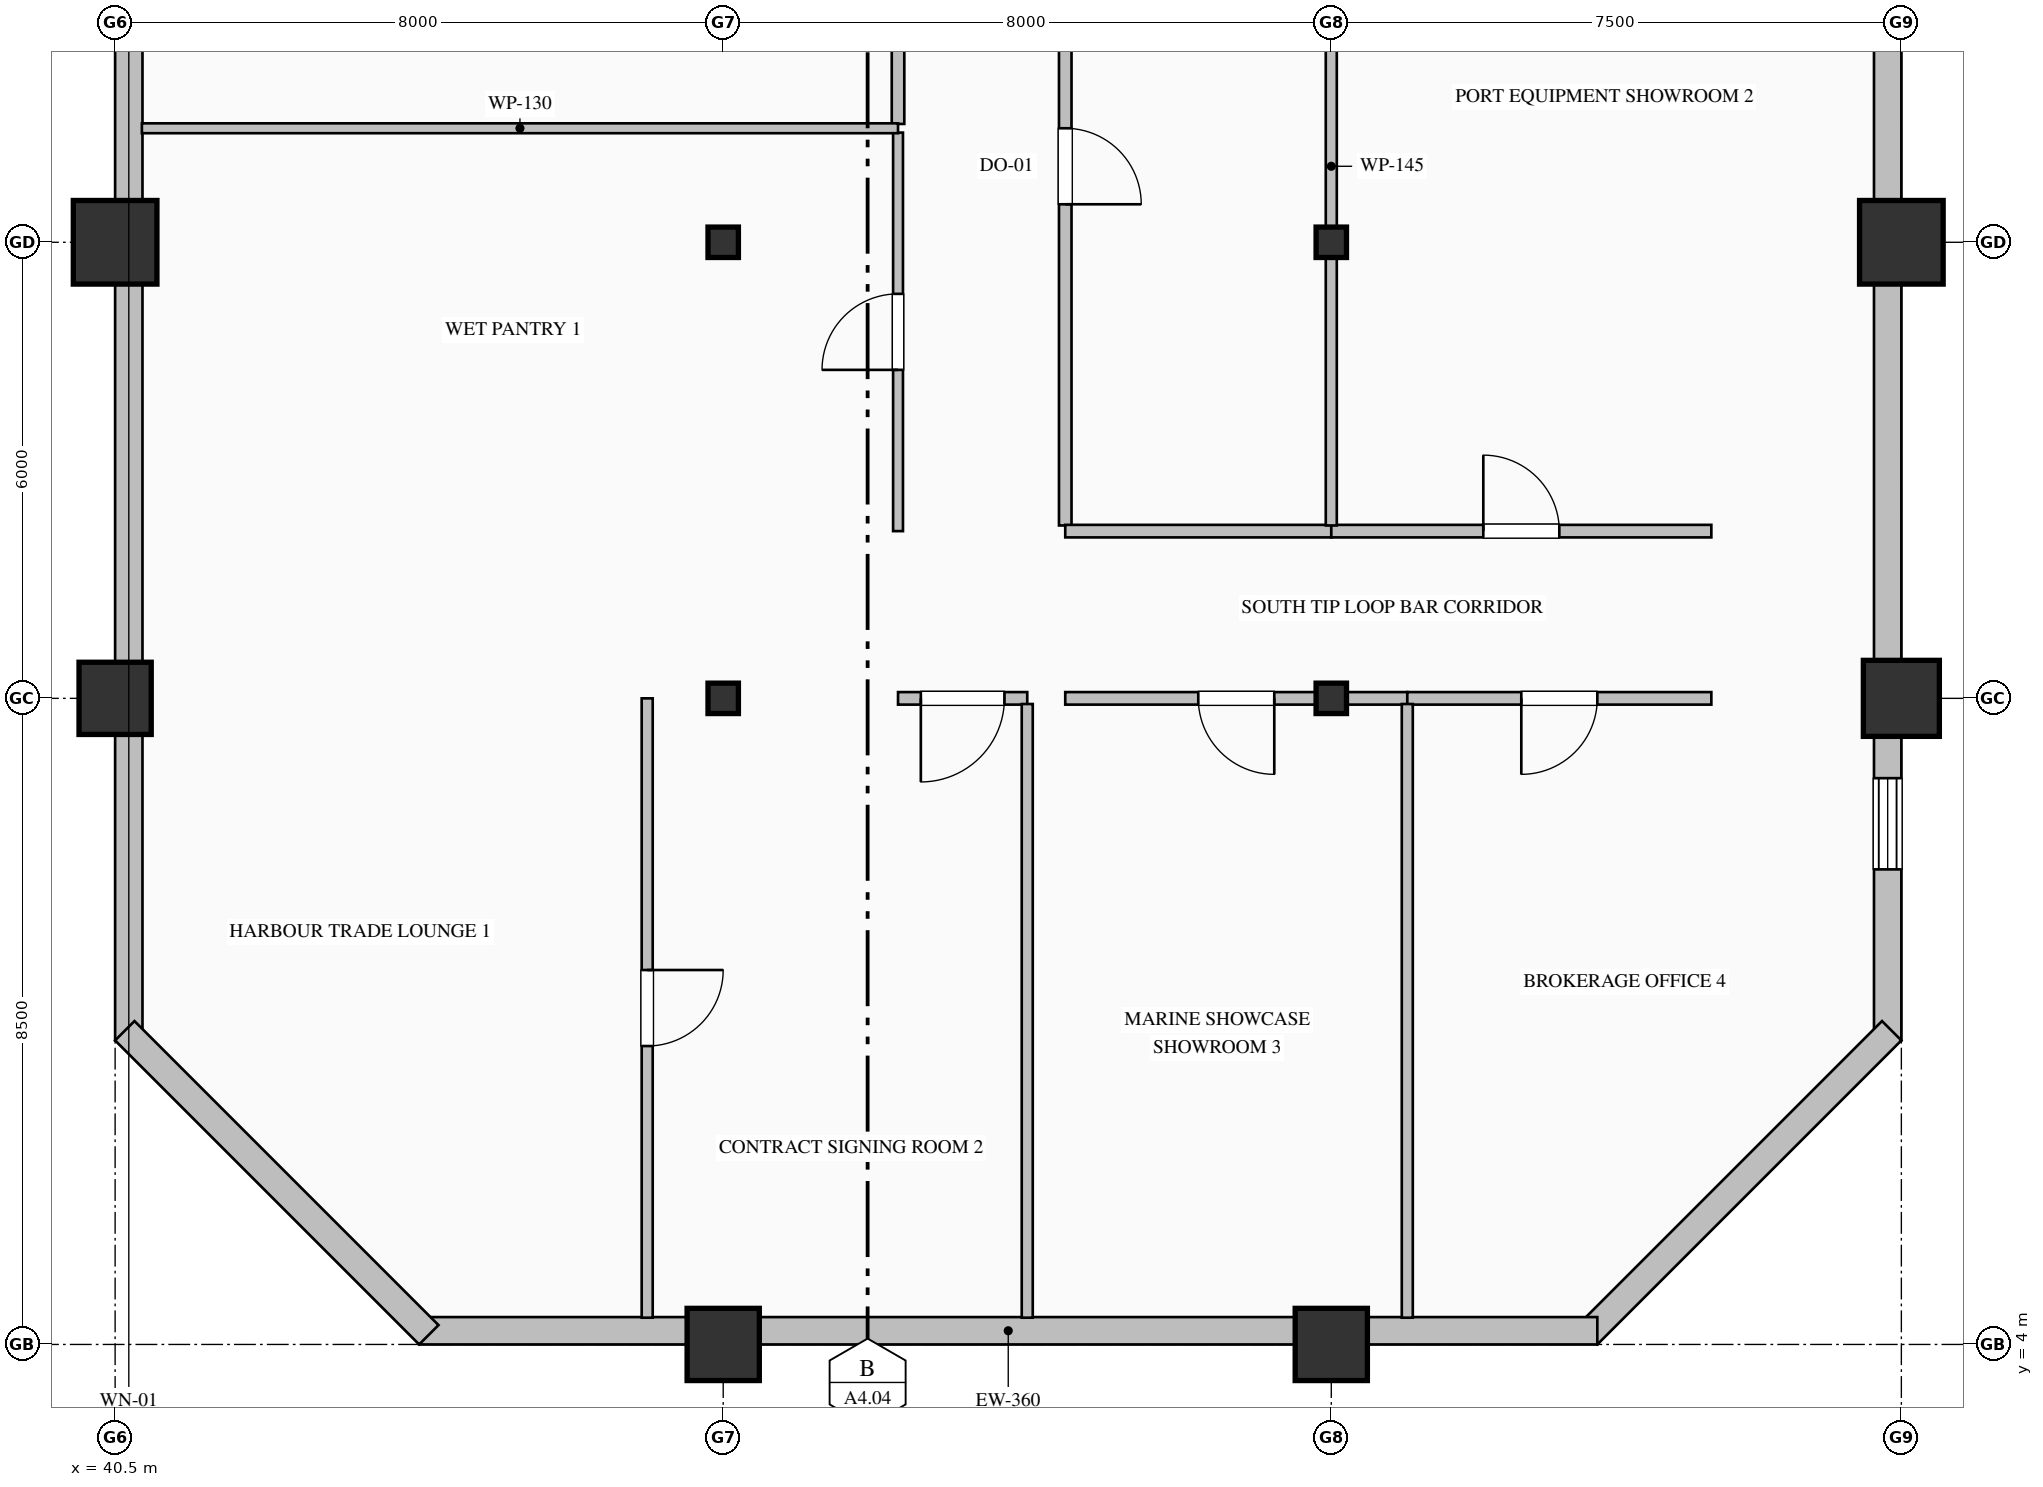
"""IFC4 building model, lengths in metres.
Left out: names, types, materials, properties, quantities, classifications, styles, units other than length and angle.
Written with IfcOpenShell. Run it as: python <this file> out.ifc"""

import sys

from ifc_helpers import new_model, si_unit, direction, frame, frame_2d, origin, origin_2d, place, context, subcontext, project, spatial, rectangle, hollow_rectangle, hollow_circle, i_section, extrude, element, fill, save


model = new_model("IFC4")
c1 = context("Model", 3, precision=1e-05, world=origin(), true_north=direction((0.0, 1.0)))
c2 = subcontext(c1, "Body", "Model", "MODEL_VIEW")
j1 = project(units=[si_unit("LENGTHUNIT", "METRE"), si_unit("PLANEANGLEUNIT", "RADIAN")], contexts=[c1])
p1 = place(None, origin())
s1 = spatial("IfcSite", under=j1, at=p1, CompositionType="ELEMENT")
p2 = place(p1, origin())
s2 = spatial("IfcBuilding", under=s1, at=p2, CompositionType="ELEMENT")
p3 = place(p2, frame((0.0, 0.0, 183.0)))
s3 = spatial("IfcBuildingStorey", under=s2, at=p3, CompositionType="ELEMENT", Elevation=183.0)
p4 = place(p3, frame((40.5, 12.5, 0.0), z_axis=(0.0, 0.0, 1.0), x_axis=(1.0, 0.0, 0.0)))
e1 = element("IfcColumn", 1, at=p4, inside=s3, PredefinedType="COLUMN", context=c2, shape_type="SweptSolid", body=[
    extrude(hollow_rectangle(XDim=0.95, YDim=0.95, WallThickness=0.036, at=origin_2d()), origin(), (0.0, 0.0, 1.0), 4.0),
])
p5 = place(p3, frame((40.5, 18.5, 0.0), z_axis=(0.0, 0.0, 1.0), x_axis=(1.0, 0.0, 0.0)))
e2 = element("IfcColumn", 2, at=p5, inside=s3, PredefinedType="COLUMN", context=c2, shape_type="SweptSolid", body=[
    extrude(hollow_rectangle(XDim=1.1, YDim=1.1, WallThickness=0.04, at=origin_2d()), origin(), (0.0, 0.0, 1.0), 4.0),
])
p6 = place(p3, frame((48.5, 4.0, 0.0), z_axis=(0.0, 0.0, 1.0), x_axis=(1.0, 0.0, 0.0)))
e3 = element("IfcColumn", 3, at=p6, inside=s3, PredefinedType="COLUMN", context=c2, shape_type="SweptSolid", body=[
    extrude(hollow_rectangle(XDim=0.95, YDim=0.95, WallThickness=0.036, at=origin_2d()), origin(), (0.0, 0.0, 1.0), 4.0),
])
for number, where, z_axis, x_axis in (
    (4, (48.5, 12.5, 0.0), (0.0, 0.0, 1.0), (1.0, 0.0, 0.0)),
    (5, (48.5, 18.5, 0.0), (0.0, 0.0, 1.0), (1.0, 0.0, 0.0)),
):
    element("IfcColumn", number, at=place(p3, frame(where, z_axis=z_axis, x_axis=x_axis)), inside=s3, PredefinedType="COLUMN", context=c2, shape_type="SweptSolid", body=[
        extrude(i_section(OverallWidth=0.4, OverallDepth=0.4, WebThickness=0.013, FlangeThickness=0.021, FilletRadius=0.022, at=origin_2d()), origin(), (0.0, 0.0, 1.0), 4.0),
    ])
p7 = place(p3, frame((56.5, 4.0, 0.0), z_axis=(0.0, 0.0, 1.0), x_axis=(1.0, 0.0, 0.0)))
e6 = element("IfcColumn", 6, at=p7, inside=s3, PredefinedType="COLUMN", context=c2, shape_type="SweptSolid", body=[
    extrude(hollow_rectangle(XDim=0.95, YDim=0.95, WallThickness=0.036, at=origin_2d()), origin(), (0.0, 0.0, 1.0), 4.0),
])
for number, where, z_axis, x_axis in (
    (7, (56.5, 12.5, 0.0), (0.0, 0.0, 1.0), (1.0, 0.0, 0.0)),
    (8, (56.5, 18.5, 0.0), (0.0, 0.0, 1.0), (1.0, 0.0, 0.0)),
):
    element("IfcColumn", number, at=place(p3, frame(where, z_axis=z_axis, x_axis=x_axis)), inside=s3, PredefinedType="COLUMN", context=c2, shape_type="SweptSolid", body=[
        extrude(i_section(OverallWidth=0.4, OverallDepth=0.4, WebThickness=0.013, FlangeThickness=0.021, FilletRadius=0.022, at=origin_2d()), origin(), (0.0, 0.0, 1.0), 4.0),
    ])
p8 = place(p3, frame((64.0, 12.5, 0.0), z_axis=(0.0, 0.0, 1.0), x_axis=(1.0, 0.0, 0.0)))
e9 = element("IfcColumn", 9, at=p8, inside=s3, PredefinedType="COLUMN", context=c2, shape_type="SweptSolid", body=[
    extrude(hollow_circle(Radius=0.5, WallThickness=0.036, at=origin_2d()), origin(), (0.0, 0.0, 1.0), 4.0),
])
p9 = place(p3, frame((64.0, 18.5, 0.0), z_axis=(0.0, 0.0, 1.0), x_axis=(1.0, 0.0, 0.0)))
e10 = element("IfcColumn", 10, at=p9, inside=s3, PredefinedType="COLUMN", context=c2, shape_type="SweptSolid", body=[
    extrude(hollow_rectangle(XDim=1.1, YDim=1.1, WallThickness=0.04, at=origin_2d()), origin(), (0.0, 0.0, 1.0), 4.0),
])
p10 = place(p3, frame((40.68, 8.0, 0.0), z_axis=(0.0, 0.0, 1.0), x_axis=(0.0, 1.0, 0.0)))
e11 = element("IfcWall", 11, at=p10, inside=s3, PredefinedType="SOLIDWALL", context=c2, shape_type="SweptSolid", body=[
    extrude(rectangle(XDim=20.36, YDim=0.36, at=frame_2d((10.18, 0.0))), origin(), (0.0, 0.0, 1.0), 3.165),
])
p11 = place(p10, frame((13.8, 0.0, 0.7)))
e12 = element("IfcOpeningElement", 12, at=p11, cuts=e11, PredefinedType="OPENING", context=c2, shape_type="SweptSolid", body=[
    extrude(rectangle(XDim=1.2, YDim=1.85, at=frame_2d((0.6, 0.925))), frame((0.0, 0.19, 0.0), z_axis=(0.0, -1.0, 0.0), x_axis=(1.0, 0.0, 0.0)), (0.0, 0.0, 1.0), 0.38),
])
p12 = place(p3, frame((63.82, 36.05, 0.0), z_axis=(0.0, 0.0, 1.0), x_axis=(0.0, -1.0, 0.0)))
e13 = element("IfcWall", 13, at=p12, inside=s3, PredefinedType="SOLIDWALL", context=c2, shape_type="SweptSolid", body=[
    extrude(rectangle(XDim=28.05, YDim=0.36, at=frame_2d((14.025, 0.0))), origin(), (0.0, 0.0, 1.0), 3.265),
])
p13 = place(p12, frame((3.0, 0.0, 0.7)))
e14 = element("IfcOpeningElement", 14, at=p13, cuts=e13, PredefinedType="OPENING", context=c2, shape_type="SweptSolid", body=[
    extrude(rectangle(XDim=1.2, YDim=1.85, at=frame_2d((0.6, 0.925))), frame((0.0, 0.19, 0.0), z_axis=(0.0, -1.0, 0.0), x_axis=(1.0, 0.0, 0.0)), (0.0, 0.0, 1.0), 0.38),
])
p14 = place(p12, frame((13.8, 0.0, 0.7)))
e15 = element("IfcOpeningElement", 15, at=p14, cuts=e13, PredefinedType="OPENING", context=c2, shape_type="SweptSolid", body=[
    extrude(rectangle(XDim=1.2, YDim=1.85, at=frame_2d((0.6, 0.925))), frame((0.0, 0.19, 0.0), z_axis=(0.0, -1.0, 0.0), x_axis=(1.0, 0.0, 0.0)), (0.0, 0.0, 1.0), 0.38),
])
p15 = place(p12, frame((24.6, 0.0, 0.7)))
e16 = element("IfcOpeningElement", 16, at=p15, cuts=e13, PredefinedType="OPENING", context=c2, shape_type="SweptSolid", body=[
    extrude(rectangle(XDim=1.2, YDim=1.85, at=frame_2d((0.6, 0.925))), frame((0.0, 0.19, 0.0), z_axis=(0.0, -1.0, 0.0), x_axis=(1.0, 0.0, 0.0)), (0.0, 0.0, 1.0), 0.38),
])
p16 = place(p3, frame((63.873, 8.127, 0.0), z_axis=(0.0, 0.0, 1.0), x_axis=(-0.707106781187, -0.707106781187, 0.0)))
e17 = element("IfcWall", 17, at=p16, inside=s3, PredefinedType="SOLIDWALL", context=c2, shape_type="SweptSolid", body=[
    extrude(rectangle(XDim=5.657, YDim=0.36, at=frame_2d((2.828, 0.0))), origin(), (0.0, 0.0, 1.0), 3.765),
])
p17 = place(p3, frame((60.0, 4.18, 0.0), z_axis=(0.0, 0.0, 1.0), x_axis=(-1.0, 0.0, 0.0)))
e18 = element("IfcWall", 18, at=p17, inside=s3, PredefinedType="SOLIDWALL", context=c2, shape_type="SweptSolid", body=[
    extrude(rectangle(XDim=15.5, YDim=0.36, at=frame_2d((7.75, 0.0))), origin(), (0.0, 0.0, 1.0), 3.265),
])
p18 = place(p3, frame((44.627, 4.127, 0.0), z_axis=(0.0, 0.0, 1.0), x_axis=(-0.707106781187, 0.707106781187, 0.0)))
e19 = element("IfcWall", 19, at=p18, inside=s3, PredefinedType="SOLIDWALL", context=c2, shape_type="SweptSolid", body=[
    extrude(rectangle(XDim=5.657, YDim=0.36, at=frame_2d((2.828, 0.0))), origin(), (0.0, 0.0, 1.0), 3.765),
])
p19 = place(p3, frame((53.0, 24.226, 0.0), z_axis=(0.0, 0.0, 1.0), x_axis=(0.0, -1.0, 0.0)))
e20 = element("IfcWall", 20, at=p19, inside=s3, PredefinedType="PARTITIONING", context=c2, shape_type="SweptSolid", body=[
    extrude(rectangle(XDim=9.451, YDim=0.165, at=frame_2d((4.726, 0.0))), origin(), (0.0, 0.0, 1.0), 3.765),
])
p20 = place(p19, frame((4.226, 0.0, 0.0)))
e21 = element("IfcOpeningElement", 21, at=p20, cuts=e20, PredefinedType="OPENING", context=c2, shape_type="SweptSolid", body=[
    extrude(rectangle(XDim=1.0, YDim=2.15, at=frame_2d((0.5, 1.075))), frame((0.0, 0.093, 0.0), z_axis=(0.0, -1.0, 0.0), x_axis=(1.0, 0.0, 0.0)), (0.0, 0.0, 1.0), 0.185),
])
p21 = place(p3, frame((50.8, 14.7, 0.0), z_axis=(0.0, 0.0, 1.0), x_axis=(0.0, 1.0, 0.0)))
e22 = element("IfcWall", 22, at=p21, inside=s3, PredefinedType="PARTITIONING", context=c2, shape_type="SweptSolid", body=[
    extrude(rectangle(XDim=5.243, YDim=0.13, at=frame_2d((2.622, 0.0))), origin(), (0.0, 0.0, 1.0), 3.765),
])
p22 = place(p21, frame((2.122, 0.0, 0.0)))
e23 = element("IfcOpeningElement", 23, at=p22, cuts=e22, PredefinedType="OPENING", context=c2, shape_type="SweptSolid", body=[
    extrude(rectangle(XDim=1.0, YDim=2.15, at=frame_2d((0.5, 1.075))), frame((0.0, 0.075, 0.0), z_axis=(0.0, -1.0, 0.0), x_axis=(1.0, 0.0, 0.0)), (0.0, 0.0, 1.0), 0.15),
])
p23 = place(p3, frame((50.8, 20.057, 0.0), z_axis=(0.0, 0.0, 1.0), x_axis=(0.0, 1.0, 0.0)))
e24 = element("IfcWall", 24, at=p23, inside=s3, PredefinedType="PARTITIONING", context=c2, shape_type="SweptSolid", body=[
    extrude(rectangle(XDim=13.469, YDim=0.165, at=frame_2d((6.734, 0.0))), origin(), (0.0, 0.0, 1.0), 3.765),
])
p24 = place(p23, frame((6.234, 0.0, 0.0)))
e25 = element("IfcOpeningElement", 25, at=p24, cuts=e24, PredefinedType="OPENING", context=c2, shape_type="SweptSolid", body=[
    extrude(rectangle(XDim=1.0, YDim=2.15, at=frame_2d((0.5, 1.075))), frame((0.0, 0.093, 0.0), z_axis=(0.0, -1.0, 0.0), x_axis=(1.0, 0.0, 0.0)), (0.0, 0.0, 1.0), 0.185),
])
p25 = place(p3, frame((52.5, 12.5, 0.0), z_axis=(0.0, 0.0, 1.0), x_axis=(-1.0, 0.0, 0.0)))
e26 = element("IfcWall", 26, at=p25, inside=s3, PredefinedType="PARTITIONING", context=c2, shape_type="SweptSolid", body=[
    extrude(rectangle(XDim=1.7, YDim=0.165, at=frame_2d((0.85, 0.0))), origin(), (0.0, 0.0, 1.0), 3.157),
])
p26 = place(p25, frame((0.3, 0.0, 0.0)))
e27 = element("IfcOpeningElement", 27, at=p26, cuts=e26, PredefinedType="OPENING", context=c2, shape_type="SweptSolid", body=[
    extrude(rectangle(XDim=1.1, YDim=2.2, at=frame_2d((0.55, 1.1))), frame((0.0, 0.093, 0.0), z_axis=(0.0, -1.0, 0.0), x_axis=(1.0, 0.0, 0.0)), (0.0, 0.0, 1.0), 0.185),
])
p27 = place(p3, frame((53.0, 14.7, 0.0), z_axis=(0.0, 0.0, 1.0), x_axis=(1.0, 0.0, 0.0)))
e28 = element("IfcWall", 28, at=p27, inside=s3, PredefinedType="PARTITIONING", context=c2, shape_type="SweptSolid", body=[
    extrude(rectangle(XDim=3.5, YDim=0.165, at=frame_2d((1.75, 0.0))), origin(), (0.0, 0.0, 1.0), 3.765),
])
p28 = place(p3, frame((56.5, 14.7, 0.0), z_axis=(0.0, 0.0, 1.0), x_axis=(1.0, 0.0, 0.0)))
e29 = element("IfcWall", 29, at=p28, inside=s3, PredefinedType="PARTITIONING", context=c2, shape_type="SweptSolid", body=[
    extrude(rectangle(XDim=5.0, YDim=0.165, at=frame_2d((2.5, 0.0))), origin(), (0.0, 0.0, 1.0), 3.765),
])
p29 = place(p28, frame((2.0, 0.0, 0.0)))
e30 = element("IfcOpeningElement", 30, at=p29, cuts=e29, PredefinedType="OPENING", context=c2, shape_type="SweptSolid", body=[
    extrude(rectangle(XDim=1.0, YDim=2.15, at=frame_2d((0.5, 1.075))), frame((0.0, 0.093, 0.0), z_axis=(0.0, -1.0, 0.0), x_axis=(1.0, 0.0, 0.0)), (0.0, 0.0, 1.0), 0.185),
])
p30 = place(p3, frame((57.5, 12.5, 0.0), z_axis=(0.0, 0.0, 1.0), x_axis=(-1.0, 0.0, 0.0)))
e31 = element("IfcWall", 31, at=p30, inside=s3, PredefinedType="PARTITIONING", context=c2, shape_type="SweptSolid", body=[
    extrude(rectangle(XDim=4.5, YDim=0.165, at=frame_2d((2.25, 0.0))), origin(), (0.0, 0.0, 1.0), 3.157),
])
p31 = place(p30, frame((1.75, 0.0, 0.0)))
e32 = element("IfcOpeningElement", 32, at=p31, cuts=e31, PredefinedType="OPENING", context=c2, shape_type="SweptSolid", body=[
    extrude(rectangle(XDim=1.0, YDim=2.15, at=frame_2d((0.5, 1.075))), frame((0.0, 0.093, 0.0), z_axis=(0.0, -1.0, 0.0), x_axis=(1.0, 0.0, 0.0)), (0.0, 0.0, 1.0), 0.185),
])
p32 = place(p3, frame((61.5, 12.5, 0.0), z_axis=(0.0, 0.0, 1.0), x_axis=(-1.0, 0.0, 0.0)))
e33 = element("IfcWall", 33, at=p32, inside=s3, PredefinedType="PARTITIONING", context=c2, shape_type="SweptSolid", body=[
    extrude(rectangle(XDim=4.0, YDim=0.165, at=frame_2d((2.0, 0.0))), origin(), (0.0, 0.0, 1.0), 3.157),
])
p33 = place(p32, frame((1.5, 0.0, 0.0)))
e34 = element("IfcOpeningElement", 34, at=p33, cuts=e33, PredefinedType="OPENING", context=c2, shape_type="SweptSolid", body=[
    extrude(rectangle(XDim=1.0, YDim=2.15, at=frame_2d((0.5, 1.075))), frame((0.0, 0.093, 0.0), z_axis=(0.0, -1.0, 0.0), x_axis=(1.0, 0.0, 0.0)), (0.0, 0.0, 1.0), 0.185),
])
p34 = place(p3, frame((56.5, 24.226, 0.0), z_axis=(0.0, 0.0, 1.0), x_axis=(0.0, -1.0, 0.0)))
e35 = element("IfcWall", 35, at=p34, inside=s3, PredefinedType="PARTITIONING", context=c2, shape_type="SweptSolid", body=[
    extrude(rectangle(XDim=9.451, YDim=0.145, at=frame_2d((4.726, 0.0))), origin(), (0.0, 0.0, 1.0), 2.957),
])
p35 = place(p3, frame((40.852, 20.0, 0.0), z_axis=(0.0, 0.0, 1.0), x_axis=(1.0, 0.0, 0.0)))
e36 = element("IfcWall", 36, at=p35, inside=s3, PredefinedType="PARTITIONING", context=c2, shape_type="SweptSolid", body=[
    extrude(rectangle(XDim=9.948, YDim=0.13, at=frame_2d((4.974, 0.0))), origin(), (0.0, 0.0, 1.0), 3.765),
])
p36 = place(p3, frame((47.5, 12.5, 0.0), z_axis=(0.0, 0.0, 1.0), x_axis=(0.0, -1.0, 0.0)))
e37 = element("IfcWall", 37, at=p36, inside=s3, PredefinedType="PARTITIONING", context=c2, shape_type="SweptSolid", body=[
    extrude(rectangle(XDim=8.148, YDim=0.145, at=frame_2d((4.074, 0.0))), origin(), (0.0, 0.0, 1.0), 3.765),
])
p37 = place(p36, frame((3.574, 0.0, 0.0)))
e38 = element("IfcOpeningElement", 38, at=p37, cuts=e37, PredefinedType="OPENING", context=c2, shape_type="SweptSolid", body=[
    extrude(rectangle(XDim=1.0, YDim=2.15, at=frame_2d((0.5, 1.075))), frame((0.0, 0.083, 0.0), z_axis=(0.0, -1.0, 0.0), x_axis=(1.0, 0.0, 0.0)), (0.0, 0.0, 1.0), 0.165),
])
for number, where, z_axis, x_axis in (
    (39, (52.5, 12.426, 0.0), (0.0, 0.0, 1.0), (0.0, -1.0, 0.0)),
    (40, (57.5, 12.426, 0.0), (0.0, 0.0, 1.0), (0.0, -1.0, 0.0)),
):
    element("IfcWall", number, at=place(p3, frame(where, z_axis=z_axis, x_axis=x_axis)), inside=s3, PredefinedType="PARTITIONING", context=c2, shape_type="SweptSolid", body=[
        extrude(rectangle(XDim=8.073, YDim=0.145, at=frame_2d((4.037, 0.0))), origin(), (0.0, 0.0, 1.0), 3.765),
    ])
p38 = place(p15, origin())
e41 = element("IfcWindow", 41, at=p38, inside=s3, PartitioningType="DOUBLE_PANEL_VERTICAL", PredefinedType="WINDOW", context=c2, shape_type="SweptSolid", body=[
    extrude(rectangle(XDim=1.2, YDim=1.85, at=frame_2d((0.6, 0.925))), frame((0.0, 0.15, 0.0), z_axis=(0.0, -1.0, 0.0), x_axis=(1.0, 0.0, 0.0)), (0.0, 0.0, 1.0), 0.06),
])
fill(e16, e41)
p39 = place(p20, origin())
e42 = element("IfcDoor", 42, at=p39, inside=s3, OperationType="SINGLE_SWING_RIGHT", PredefinedType="DOOR", context=c2, shape_type="SweptSolid", body=[
    extrude(rectangle(XDim=1.0, YDim=2.15, at=frame_2d((0.5, 1.075))), frame((0.0, 0.025, 0.0), z_axis=(0.0, -1.0, 0.0), x_axis=(1.0, 0.0, 0.0)), (0.0, 0.0, 1.0), 0.05),
])
fill(e21, e42)
p40 = place(p29, origin())
e43 = element("IfcDoor", 43, at=p40, inside=s3, OperationType="SINGLE_SWING_LEFT", PredefinedType="DOOR", context=c2, shape_type="SweptSolid", body=[
    extrude(rectangle(XDim=1.0, YDim=2.15, at=frame_2d((0.5, 1.075))), frame((0.0, 0.025, 0.0), z_axis=(0.0, -1.0, 0.0), x_axis=(1.0, 0.0, 0.0)), (0.0, 0.0, 1.0), 0.05),
])
fill(e30, e43)
p41 = place(p22, origin())
e44 = element("IfcDoor", 44, at=p41, inside=s3, OperationType="SINGLE_SWING_LEFT", PredefinedType="DOOR", context=c2, shape_type="SweptSolid", body=[
    extrude(rectangle(XDim=1.0, YDim=2.15, at=frame_2d((0.5, 1.075))), frame((0.0, 0.025, 0.0), z_axis=(0.0, -1.0, 0.0), x_axis=(1.0, 0.0, 0.0)), (0.0, 0.0, 1.0), 0.05),
])
fill(e23, e44)
p42 = place(p37, origin())
e45 = element("IfcDoor", 45, at=p42, inside=s3, OperationType="SINGLE_SWING_LEFT", PredefinedType="DOOR", context=c2, shape_type="SweptSolid", body=[
    extrude(rectangle(XDim=1.0, YDim=2.15, at=frame_2d((0.5, 1.075))), frame((0.0, 0.025, 0.0), z_axis=(0.0, -1.0, 0.0), x_axis=(1.0, 0.0, 0.0)), (0.0, 0.0, 1.0), 0.05),
])
fill(e38, e45)
p43 = place(p26, origin())
e46 = element("IfcDoor", 46, at=p43, inside=s3, OperationType="SINGLE_SWING_RIGHT", PredefinedType="DOOR", context=c2, shape_type="SweptSolid", body=[
    extrude(rectangle(XDim=1.1, YDim=2.2, at=frame_2d((0.55, 1.1))), frame((0.0, 0.025, 0.0), z_axis=(0.0, -1.0, 0.0), x_axis=(1.0, 0.0, 0.0)), (0.0, 0.0, 1.0), 0.05),
])
fill(e27, e46)
p44 = place(p31, origin())
e47 = element("IfcDoor", 47, at=p44, inside=s3, OperationType="SINGLE_SWING_LEFT", PredefinedType="DOOR", context=c2, shape_type="SweptSolid", body=[
    extrude(rectangle(XDim=1.0, YDim=2.15, at=frame_2d((0.5, 1.075))), frame((0.0, 0.025, 0.0), z_axis=(0.0, -1.0, 0.0), x_axis=(1.0, 0.0, 0.0)), (0.0, 0.0, 1.0), 0.05),
])
fill(e32, e47)
p45 = place(p33, origin())
e48 = element("IfcDoor", 48, at=p45, inside=s3, OperationType="SINGLE_SWING_RIGHT", PredefinedType="DOOR", context=c2, shape_type="SweptSolid", body=[
    extrude(rectangle(XDim=1.0, YDim=2.15, at=frame_2d((0.5, 1.075))), frame((0.0, 0.025, 0.0), z_axis=(0.0, -1.0, 0.0), x_axis=(1.0, 0.0, 0.0)), (0.0, 0.0, 1.0), 0.05),
])
fill(e34, e48)
save(model, sys.argv[1])
